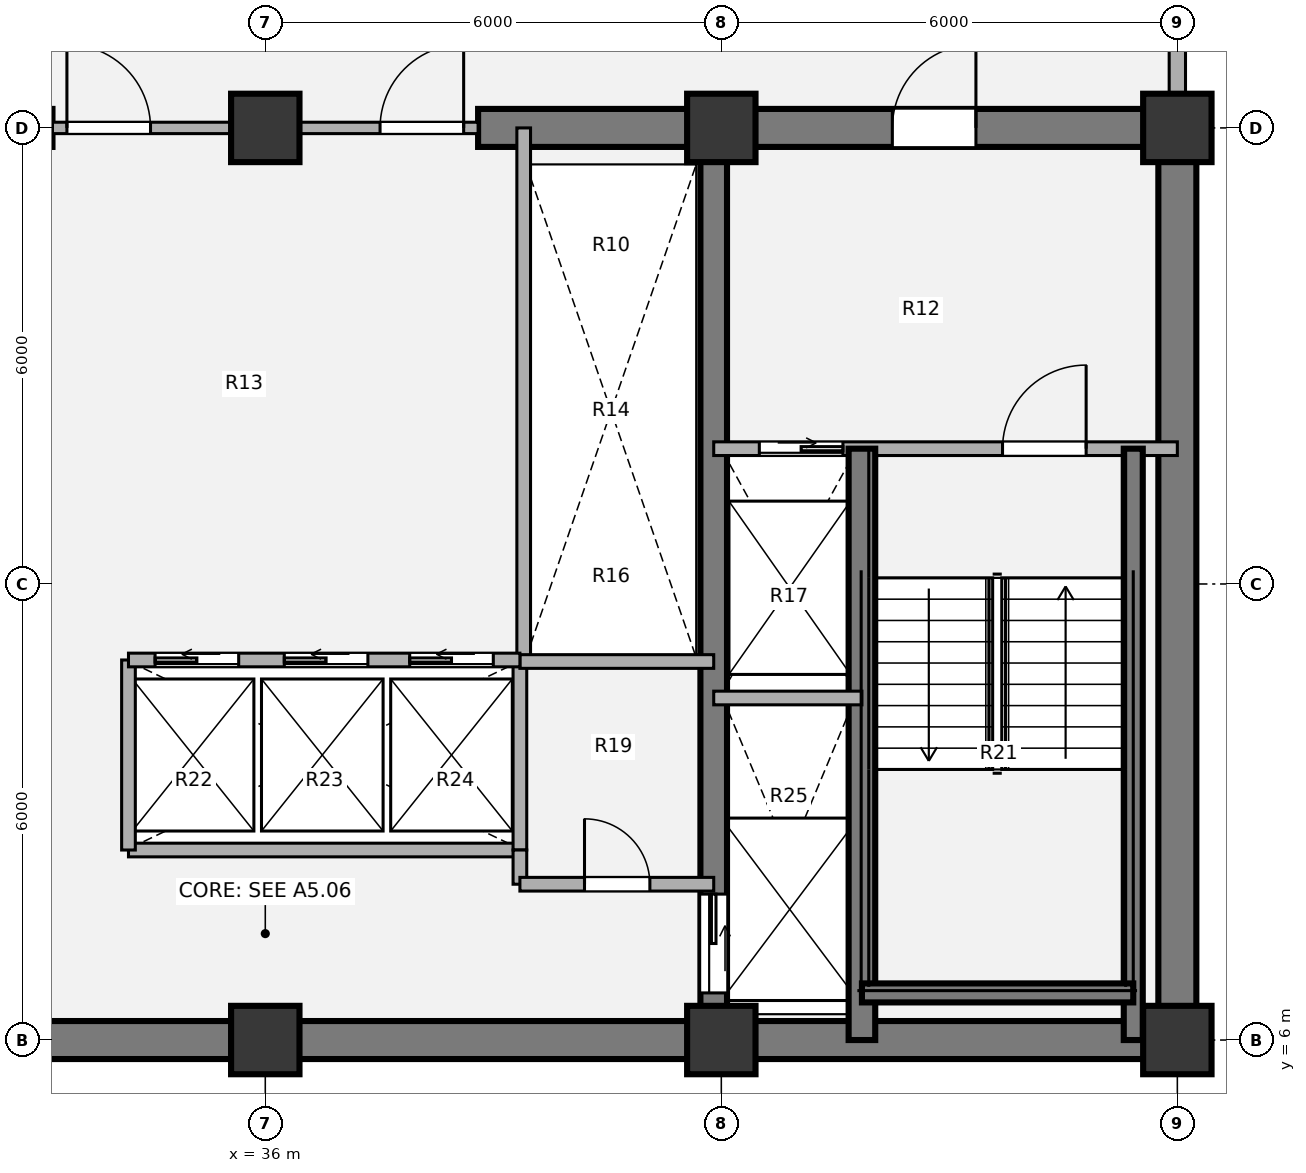
"""IFC4 building model, lengths in metres.
Left out: names, types, materials, properties, quantities, classifications, styles, units other than length and angle.
Written with IfcOpenShell. Run it as: python <this file> out.ifc"""

import sys

from ifc_helpers import new_model, si_unit, direction, frame, frame_2d, origin, origin_2d, place, context, subcontext, project, spatial, rectangle, extrude, source, transform, mapped, element, fill, save


model = new_model("IFC4")
c1 = context("Model", 3, precision=1e-05, world=origin(), true_north=direction((0.0, 1.0)))
c2 = subcontext(c1, "Body", "Model", "MODEL_VIEW")
j1 = project(units=[si_unit("LENGTHUNIT", "METRE"), si_unit("PLANEANGLEUNIT", "RADIAN")], contexts=[c1])
p1 = place(None, origin())
s1 = spatial("IfcSite", under=j1, at=p1, CompositionType="ELEMENT")
p2 = place(p1, origin())
s2 = spatial("IfcBuilding", under=s1, at=p2, CompositionType="ELEMENT")
p3 = place(p2, frame((0.0, 0.0, 108.72)))
s3 = spatial("IfcBuildingStorey", under=s2, at=p3, CompositionType="ELEMENT", Elevation=108.72)
m1 = source(origin(), c2, "Body", "SweptSolid", [
    extrude(rectangle(XDim=0.9, YDim=0.9, at=origin_2d()), origin(), (0.0, 0.0, 1.0), 3.78),
])
for number, where, z_axis, x_axis in (
    (1, (36.0, 6.0, 0.0), (0.0, 0.0, 1.0), (1.0, 0.0, 0.0)),
    (2, (42.0, 6.0, 0.0), (0.0, 0.0, 1.0), (1.0, 0.0, 0.0)),
    (3, (48.0, 6.0, 0.0), (0.0, 0.0, 1.0), (1.0, 0.0, 0.0)),
    (4, (36.0, 18.0, 0.0), (0.0, 0.0, 1.0), (1.0, 0.0, 0.0)),
    (5, (42.0, 18.0, 0.0), (0.0, 0.0, 1.0), (1.0, 0.0, 0.0)),
    (6, (48.0, 18.0, 0.0), (0.0, 0.0, 1.0), (1.0, 0.0, 0.0)),
):
    element("IfcColumn", number, at=place(p3, frame(where, z_axis=z_axis, x_axis=x_axis)), inside=s3, PredefinedType="COLUMN", context=c2, shape_type="MappedRepresentation", body=[
        mapped(m1, transform((0.0, 0.0, 0.0), x_axis=(1.0, 0.0, 0.0), y_axis=(0.0, 1.0, 0.0), z_axis=(0.0, 0.0, 1.0), scale=1.0)),
    ])
p4 = place(p3, frame((48.25, 6.0, 0.0), z_axis=(0.0, 0.0, 1.0), x_axis=(-1.0, 0.0, 0.0)))
e7 = element("IfcWall", 7, at=p4, inside=s3, PredefinedType="SHEAR", context=c2, shape_type="SweptSolid", body=[
    extrude(rectangle(XDim=24.5, YDim=0.5, at=frame_2d((12.25, 0.0))), origin(), (0.0, 0.0, 1.0), 3.78),
])
p5 = place(p3, frame((48.0, 18.0, 0.0), z_axis=(0.0, 0.0, 1.0), x_axis=(0.0, -1.0, 0.0)))
e8 = element("IfcWall", 8, at=p5, inside=s3, PredefinedType="SHEAR", context=c2, shape_type="SweptSolid", body=[
    extrude(rectangle(XDim=12.0, YDim=0.5, at=frame_2d((6.0, 0.0))), origin(), (0.0, 0.0, 1.0), 3.78),
])
p6 = place(p3, frame((23.75, 18.0, 0.0), z_axis=(0.0, 0.0, 1.0), x_axis=(1.0, 0.0, 0.0)))
e9 = element("IfcWall", 9, at=p6, inside=s3, PredefinedType="SHEAR", context=c2, shape_type="SweptSolid", body=[
    extrude(rectangle(XDim=9.45, YDim=0.5, at=frame_2d((4.725, 0.0))), origin(), (0.0, 0.0, 1.0), 3.78),
])
p7 = place(p6, frame((2.95, 0.0, 0.0)))
e10 = element("IfcOpeningElement", 10, at=p7, cuts=e9, PredefinedType="OPENING", context=c2, shape_type="SweptSolid", body=[
    extrude(rectangle(XDim=1.1, YDim=2.1, at=origin_2d()), frame((0.55, 0.26, 1.05), z_axis=(0.0, -1.0, 0.0), x_axis=(1.0, 0.0, 0.0)), (0.0, 0.0, 1.0), 0.52),
])
p8 = place(p3, frame((38.8, 18.0, 0.0), z_axis=(0.0, 0.0, 1.0), x_axis=(1.0, 0.0, 0.0)))
e11 = element("IfcWall", 11, at=p8, inside=s3, PredefinedType="SHEAR", context=c2, shape_type="SweptSolid", body=[
    extrude(rectangle(XDim=9.45, YDim=0.5, at=frame_2d((4.725, 0.0))), origin(), (0.0, 0.0, 1.0), 3.78),
])
p9 = place(p8, frame((5.45, 0.0, 0.0)))
e12 = element("IfcOpeningElement", 12, at=p9, cuts=e11, PredefinedType="OPENING", context=c2, shape_type="SweptSolid", body=[
    extrude(rectangle(XDim=1.1, YDim=2.1, at=origin_2d()), frame((0.55, 0.26, 1.05), z_axis=(0.0, -1.0, 0.0), x_axis=(1.0, 0.0, 0.0)), (0.0, 0.0, 1.0), 0.52),
])
p10 = place(p3, frame((41.9, 18.0, 0.0), z_axis=(0.0, 0.0, 1.0), x_axis=(0.0, -1.0, 0.0)))
e13 = element("IfcWall", 13, at=p10, inside=s3, PredefinedType="SHEAR", context=c2, shape_type="SweptSolid", body=[
    extrude(rectangle(XDim=12.0, YDim=0.35, at=frame_2d((6.0, 0.0))), origin(), (0.0, 0.0, 1.0), 3.78),
])
p11 = place(p10, frame((10.08, 0.0, 0.0)))
e14 = element("IfcOpeningElement", 14, at=p11, cuts=e13, PredefinedType="OPENING", context=c2, shape_type="SweptSolid", body=[
    extrude(rectangle(XDim=1.3, YDim=2.1, at=origin_2d()), frame((0.65, 0.185, 1.05), z_axis=(0.0, -1.0, 0.0), x_axis=(1.0, 0.0, 0.0)), (0.0, 0.0, 1.0), 0.37),
])
p12 = place(p3, frame((48.0, 21.05, 0.0), z_axis=(0.0, 0.0, 1.0), x_axis=(0.0, -1.0, 0.0)))
e15 = element("IfcWall", 15, at=p12, inside=s3, PredefinedType="SOLIDWALL", context=c2, shape_type="SweptSolid", body=[
    extrude(rectangle(XDim=2.62, YDim=0.215, at=frame_2d((1.31, 0.0))), origin(), (0.0, 0.0, 1.0), 3.53),
])
p13 = place(p3, frame((34.2, 8.5, 0.0), z_axis=(0.0, 0.0, 1.0), x_axis=(1.0, 0.0, 0.0)))
e16 = element("IfcWall", 16, at=p13, inside=s3, PredefinedType="PARTITIONING", context=c2, shape_type="SweptSolid", body=[
    extrude(rectangle(XDim=5.15, YDim=0.18, at=frame_2d((2.575, 0.0))), origin(), (0.0, 0.0, 1.0), 3.5),
])
for number, where, z_axis, x_axis in (
    (17, (34.2, 8.5, 0.0), (0.0, 0.0, 1.0), (0.0, 1.0, 0.0)),
    (18, (39.35, 8.5, 0.0), (0.0, 0.0, 1.0), (0.0, 1.0, 0.0)),
):
    element("IfcWall", number, at=place(p3, frame(where, z_axis=z_axis, x_axis=x_axis)), inside=s3, PredefinedType="PARTITIONING", context=c2, shape_type="SweptSolid", body=[
        extrude(rectangle(XDim=2.5, YDim=0.18, at=frame_2d((1.25, 0.0))), origin(), (0.0, 0.0, 1.0), 3.5),
    ])
p14 = place(p3, frame((39.4, 11.0, 0.0), z_axis=(0.0, 0.0, 1.0), x_axis=(0.0, 1.0, 0.0)))
e19 = element("IfcWall", 19, at=p14, inside=s3, PredefinedType="PARTITIONING", context=c2, shape_type="SweptSolid", body=[
    extrude(rectangle(XDim=7.0, YDim=0.18, at=frame_2d((3.5, 0.0))), origin(), (0.0, 0.0, 1.0), 3.5),
])
p15 = place(p3, frame((39.35, 10.98, 0.0), z_axis=(0.0, 0.0, 1.0), x_axis=(1.0, 0.0, 0.0)))
e20 = element("IfcWall", 20, at=p15, inside=s3, PredefinedType="PARTITIONING", context=c2, shape_type="SweptSolid", body=[
    extrude(rectangle(XDim=2.55, YDim=0.18, at=frame_2d((1.275, 0.0))), origin(), (0.0, 0.0, 1.0), 3.5),
])
p16 = place(p3, frame((39.35, 8.05, 0.0), z_axis=(0.0, 0.0, 1.0), x_axis=(0.0, 1.0, 0.0)))
e21 = element("IfcWall", 21, at=p16, inside=s3, PredefinedType="PARTITIONING", context=c2, shape_type="SweptSolid", body=[
    extrude(rectangle(XDim=0.45, YDim=0.18, at=frame_2d((0.225, 0.0))), origin(), (0.0, 0.0, 1.0), 3.5),
])
p17 = place(p3, frame((39.35, 8.05, 0.0), z_axis=(0.0, 0.0, 1.0), x_axis=(1.0, 0.0, 0.0)))
e22 = element("IfcWall", 22, at=p17, inside=s3, PredefinedType="PARTITIONING", context=c2, shape_type="SweptSolid", body=[
    extrude(rectangle(XDim=2.55, YDim=0.18, at=frame_2d((1.275, 0.0))), origin(), (0.0, 0.0, 1.0), 3.5),
])
p18 = place(p17, frame((0.85, 0.0, 0.0)))
e23 = element("IfcOpeningElement", 23, at=p18, cuts=e22, PredefinedType="OPENING", context=c2, shape_type="SweptSolid", body=[
    extrude(rectangle(XDim=0.86, YDim=2.1, at=origin_2d()), frame((0.43, 0.1, 1.05), z_axis=(0.0, -1.0, 0.0), x_axis=(1.0, 0.0, 0.0)), (0.0, 0.0, 1.0), 0.2),
])
p19 = place(p3, frame((33.2, 18.0, 0.0), z_axis=(0.0, 0.0, 1.0), x_axis=(1.0, 0.0, 0.0)))
e24 = element("IfcWall", 24, at=p19, inside=s3, PredefinedType="PARTITIONING", context=c2, shape_type="SweptSolid", body=[
    extrude(rectangle(XDim=5.6, YDim=0.15, at=frame_2d((2.8, 0.0))), origin(), (0.0, 0.0, 1.0), 2.315),
])
p20 = place(p19, frame((0.19, 0.0, 0.0)))
e25 = element("IfcOpeningElement", 25, at=p20, cuts=e24, PredefinedType="OPENING", context=c2, shape_type="SweptSolid", body=[
    extrude(rectangle(XDim=1.1, YDim=2.1, at=origin_2d()), frame((0.55, 0.085, 1.05), z_axis=(0.0, -1.0, 0.0), x_axis=(1.0, 0.0, 0.0)), (0.0, 0.0, 1.0), 0.17),
])
p21 = place(p19, frame((4.31, 0.0, 0.0)))
e26 = element("IfcOpeningElement", 26, at=p21, cuts=e24, PredefinedType="OPENING", context=c2, shape_type="SweptSolid", body=[
    extrude(rectangle(XDim=1.1, YDim=2.1, at=origin_2d()), frame((0.55, 0.085, 1.05), z_axis=(0.0, -1.0, 0.0), x_axis=(1.0, 0.0, 0.0)), (0.0, 0.0, 1.0), 0.17),
])
p22 = place(p3, frame((41.9, 13.78, 0.0), z_axis=(0.0, 0.0, 1.0), x_axis=(1.0, 0.0, 0.0)))
e27 = element("IfcWall", 27, at=p22, inside=s3, PredefinedType="PARTITIONING", context=c2, shape_type="SweptSolid", body=[
    extrude(rectangle(XDim=6.1, YDim=0.18, at=frame_2d((3.05, 0.0))), origin(), (0.0, 0.0, 1.0), 3.5),
])
p23 = place(p22, frame((0.6, 0.0, 0.0)))
e28 = element("IfcOpeningElement", 28, at=p23, cuts=e27, PredefinedType="OPENING", context=c2, shape_type="SweptSolid", body=[
    extrude(rectangle(XDim=1.1, YDim=2.1, at=origin_2d()), frame((0.55, 0.1, 1.05), z_axis=(0.0, -1.0, 0.0), x_axis=(1.0, 0.0, 0.0)), (0.0, 0.0, 1.0), 0.2),
])
p24 = place(p22, frame((3.8, 0.0, 0.0)))
e29 = element("IfcOpeningElement", 29, at=p24, cuts=e27, PredefinedType="OPENING", context=c2, shape_type="SweptSolid", body=[
    extrude(rectangle(XDim=1.1, YDim=2.1, at=origin_2d()), frame((0.55, 0.1, 1.05), z_axis=(0.0, -1.0, 0.0), x_axis=(1.0, 0.0, 0.0)), (0.0, 0.0, 1.0), 0.2),
])
p25 = place(p3, frame((43.85, 6.0, 0.0), z_axis=(0.0, 0.0, 1.0), x_axis=(0.0, 1.0, 0.0)))
e30 = element("IfcWall", 30, at=p25, inside=s3, PredefinedType="SHEAR", context=c2, shape_type="SweptSolid", body=[
    extrude(rectangle(XDim=7.78, YDim=0.35, at=frame_2d((3.89, 0.0))), origin(), (0.0, 0.0, 1.0), 3.85),
])
p26 = place(p3, frame((47.42, 6.0, 0.0), z_axis=(0.0, 0.0, 1.0), x_axis=(0.0, 1.0, 0.0)))
e31 = element("IfcWall", 31, at=p26, inside=s3, PredefinedType="SHEAR", context=c2, shape_type="SweptSolid", body=[
    extrude(rectangle(XDim=7.78, YDim=0.25, at=frame_2d((3.89, 0.0))), origin(), (0.0, 0.0, 1.0), 3.85),
])
p27 = place(p3, frame((43.85, 6.62, 0.0), z_axis=(0.0, 0.0, 1.0), x_axis=(1.0, 0.0, 0.0)))
e32 = element("IfcWall", 32, at=p27, inside=s3, PredefinedType="SHEAR", context=c2, shape_type="SweptSolid", body=[
    extrude(rectangle(XDim=3.57, YDim=0.25, at=frame_2d((1.785, 0.0))), origin(), (0.0, 0.0, 1.0), 3.85),
])
p28 = place(p3, frame((41.9, 10.5, 0.0), z_axis=(0.0, 0.0, 1.0), x_axis=(1.0, 0.0, 0.0)))
e33 = element("IfcWall", 33, at=p28, inside=s3, PredefinedType="PARTITIONING", context=c2, shape_type="SweptSolid", body=[
    extrude(rectangle(XDim=1.95, YDim=0.18, at=frame_2d((0.975, 0.0))), origin(), (0.0, 0.0, 1.0), 3.5),
])
p29 = place(p3, frame((34.2, 11.0, 0.0), z_axis=(0.0, 0.0, 1.0), x_axis=(1.0, 0.0, 0.0)))
e34 = element("IfcWall", 34, at=p29, inside=s3, PredefinedType="PARTITIONING", context=c2, shape_type="SweptSolid", body=[
    extrude(rectangle(XDim=5.15, YDim=0.18, at=frame_2d((2.575, 0.0))), origin(), (0.0, 0.0, 1.0), 3.5),
])
p30 = place(p29, frame((0.35, 0.0, 0.0)))
e35 = element("IfcOpeningElement", 35, at=p30, cuts=e34, PredefinedType="OPENING", context=c2, shape_type="SweptSolid", body=[
    extrude(rectangle(XDim=1.1, YDim=2.1, at=origin_2d()), frame((0.55, 0.1, 1.05), z_axis=(0.0, -1.0, 0.0), x_axis=(1.0, 0.0, 0.0)), (0.0, 0.0, 1.0), 0.2),
])
p31 = place(p29, frame((2.05, 0.0, 0.0)))
e36 = element("IfcOpeningElement", 36, at=p31, cuts=e34, PredefinedType="OPENING", context=c2, shape_type="SweptSolid", body=[
    extrude(rectangle(XDim=1.1, YDim=2.1, at=origin_2d()), frame((0.55, 0.1, 1.05), z_axis=(0.0, -1.0, 0.0), x_axis=(1.0, 0.0, 0.0)), (0.0, 0.0, 1.0), 0.2),
])
p32 = place(p29, frame((3.7, 0.0, 0.0)))
e37 = element("IfcOpeningElement", 37, at=p32, cuts=e34, PredefinedType="OPENING", context=c2, shape_type="SweptSolid", body=[
    extrude(rectangle(XDim=1.1, YDim=2.1, at=origin_2d()), frame((0.55, 0.1, 1.05), z_axis=(0.0, -1.0, 0.0), x_axis=(1.0, 0.0, 0.0)), (0.0, 0.0, 1.0), 0.2),
])
m2 = source(origin(), c2, "Body", "SweptSolid", [
    extrude(rectangle(XDim=0.86, YDim=2.1, at=origin_2d()), frame((0.43, 0.025, 1.05), z_axis=(0.0, -1.0, 0.0), x_axis=(1.0, 0.0, 0.0)), (0.0, 0.0, 1.0), 0.05),
])
p33 = place(p18, origin())
e38 = element("IfcDoor", 38, at=p33, inside=s3, OperationType="SINGLE_SWING_LEFT", PredefinedType="DOOR", context=c2, shape_type="MappedRepresentation", body=[
    mapped(m2, transform((0.0, 0.0, 0.0), x_axis=(1.0, 0.0, 0.0), y_axis=(0.0, 1.0, 0.0), z_axis=(0.0, 0.0, 1.0), scale=1.0)),
])
fill(e23, e38)
m3 = source(origin(), c2, "Body", "SweptSolid", [
    extrude(rectangle(XDim=1.1, YDim=2.1, at=origin_2d()), frame((0.55, 0.025, 1.05), z_axis=(0.0, -1.0, 0.0), x_axis=(1.0, 0.0, 0.0)), (0.0, 0.0, 1.0), 0.05),
])
p34 = place(p20, origin())
e39 = element("IfcDoor", 39, at=p34, inside=s3, OperationType="SINGLE_SWING_LEFT", PredefinedType="DOOR", context=c2, shape_type="MappedRepresentation", body=[
    mapped(m3, transform((0.0, 0.0, 0.0), x_axis=(1.0, 0.0, 0.0), y_axis=(0.0, 1.0, 0.0), z_axis=(0.0, 0.0, 1.0), scale=1.0)),
])
fill(e25, e39)
p35 = place(p21, origin())
e40 = element("IfcDoor", 40, at=p35, inside=s3, OperationType="SINGLE_SWING_RIGHT", PredefinedType="DOOR", context=c2, shape_type="MappedRepresentation", body=[
    mapped(m3, transform((0.0, 0.0, 0.0), x_axis=(1.0, 0.0, 0.0), y_axis=(0.0, 1.0, 0.0), z_axis=(0.0, 0.0, 1.0), scale=1.0)),
])
fill(e26, e40)
m4 = source(origin(), c2, "Body", "SweptSolid", [
    extrude(rectangle(XDim=1.1, YDim=2.1, at=origin_2d()), frame((0.55, 0.025, 1.05), z_axis=(0.0, -1.0, 0.0), x_axis=(1.0, 0.0, 0.0)), (0.0, 0.0, 1.0), 0.05),
])
p36 = place(p23, origin())
e41 = element("IfcDoor", 41, at=p36, inside=s3, OperationType="SLIDING_TO_RIGHT", PredefinedType="DOOR", context=c2, shape_type="MappedRepresentation", body=[
    mapped(m4, transform((0.0, 0.0, 0.0), x_axis=(1.0, 0.0, 0.0), y_axis=(0.0, 1.0, 0.0), z_axis=(0.0, 0.0, 1.0), scale=1.0)),
])
fill(e28, e41)
m5 = source(origin(), c2, "Body", "SweptSolid", [
    extrude(rectangle(XDim=1.1, YDim=2.1, at=origin_2d()), frame((0.55, 0.025, 1.05), z_axis=(0.0, -1.0, 0.0), x_axis=(1.0, 0.0, 0.0)), (0.0, 0.0, 1.0), 0.05),
])
p37 = place(p24, origin())
e42 = element("IfcDoor", 42, at=p37, inside=s3, OperationType="SINGLE_SWING_RIGHT", PredefinedType="DOOR", context=c2, shape_type="MappedRepresentation", body=[
    mapped(m5, transform((0.0, 0.0, 0.0), x_axis=(1.0, 0.0, 0.0), y_axis=(0.0, 1.0, 0.0), z_axis=(0.0, 0.0, 1.0), scale=1.0)),
])
fill(e29, e42)
m6 = source(origin(), c2, "Body", "SweptSolid", [
    extrude(rectangle(XDim=1.3, YDim=2.1, at=origin_2d()), frame((0.65, 0.025, 1.05), z_axis=(0.0, -1.0, 0.0), x_axis=(1.0, 0.0, 0.0)), (0.0, 0.0, 1.0), 0.05),
])
p38 = place(p11, origin())
e43 = element("IfcDoor", 43, at=p38, inside=s3, OperationType="SLIDING_TO_LEFT", PredefinedType="DOOR", context=c2, shape_type="MappedRepresentation", body=[
    mapped(m6, transform((0.0, 0.0, 0.0), x_axis=(1.0, 0.0, 0.0), y_axis=(0.0, 1.0, 0.0), z_axis=(0.0, 0.0, 1.0), scale=1.0)),
])
fill(e14, e43)
p39 = place(p9, origin())
e44 = element("IfcDoor", 44, at=p39, inside=s3, OperationType="SINGLE_SWING_RIGHT", PredefinedType="DOOR", context=c2, shape_type="MappedRepresentation", body=[
    mapped(m3, transform((0.0, 0.0, 0.0), x_axis=(1.0, 0.0, 0.0), y_axis=(0.0, 1.0, 0.0), z_axis=(0.0, 0.0, 1.0), scale=1.0)),
])
fill(e12, e44)
p40 = place(p30, origin())
e45 = element("IfcDoor", 45, at=p40, inside=s3, OperationType="SLIDING_TO_LEFT", PredefinedType="DOOR", context=c2, shape_type="MappedRepresentation", body=[
    mapped(m4, transform((0.0, 0.0, 0.0), x_axis=(1.0, 0.0, 0.0), y_axis=(0.0, 1.0, 0.0), z_axis=(0.0, 0.0, 1.0), scale=1.0)),
])
fill(e35, e45)
p41 = place(p31, origin())
e46 = element("IfcDoor", 46, at=p41, inside=s3, OperationType="SLIDING_TO_LEFT", PredefinedType="DOOR", context=c2, shape_type="MappedRepresentation", body=[
    mapped(m4, transform((0.0, 0.0, 0.0), x_axis=(1.0, 0.0, 0.0), y_axis=(0.0, 1.0, 0.0), z_axis=(0.0, 0.0, 1.0), scale=1.0)),
])
fill(e36, e46)
p42 = place(p32, origin())
e47 = element("IfcDoor", 47, at=p42, inside=s3, OperationType="SLIDING_TO_LEFT", PredefinedType="DOOR", context=c2, shape_type="MappedRepresentation", body=[
    mapped(m4, transform((0.0, 0.0, 0.0), x_axis=(1.0, 0.0, 0.0), y_axis=(0.0, 1.0, 0.0), z_axis=(0.0, 0.0, 1.0), scale=1.0)),
])
fill(e37, e47)
save(model, sys.argv[1])
